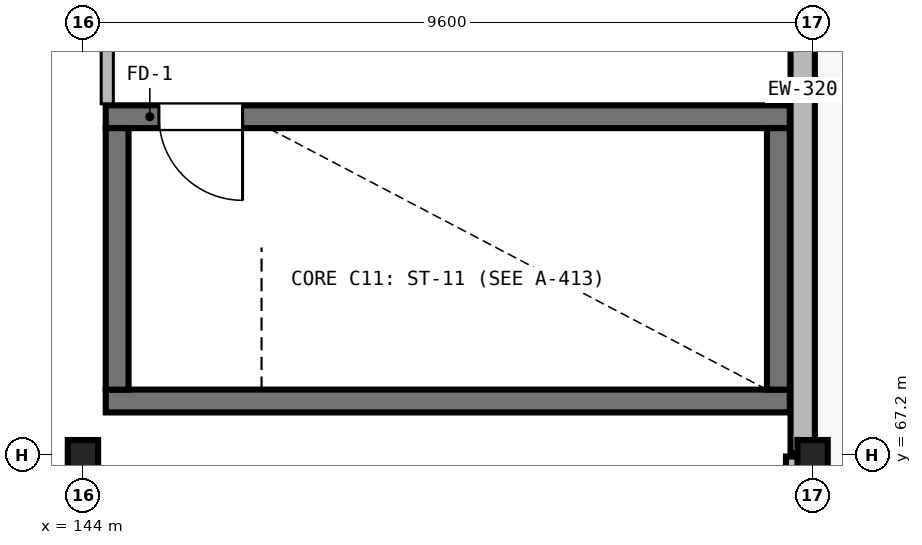
"""IFC4 building model, lengths in metres.
Left out: names, types, materials, properties, quantities, classifications, styles, units other than length and angle.
Written with IfcOpenShell. Run it as: python <this file> out.ifc"""

import sys

from ifc_helpers import new_model, si_unit, direction, frame, frame_2d, origin, origin_2d, place, context, subcontext, project, spatial, rectangle, i_section, extrude, element, fill, save


model = new_model("IFC4")
c1 = context("Model", 3, precision=1e-05, world=origin(), true_north=direction((0.0, 1.0)))
c2 = subcontext(c1, "Body", "Model", "MODEL_VIEW")
j1 = project(units=[si_unit("LENGTHUNIT", "METRE"), si_unit("PLANEANGLEUNIT", "RADIAN")], contexts=[c1])
p1 = place(None, origin())
s1 = spatial("IfcSite", under=j1, at=p1, CompositionType="ELEMENT")
p2 = place(p1, origin())
s2 = spatial("IfcBuilding", under=s1, at=p2, CompositionType="ELEMENT")
p3 = place(p2, origin())
s3 = spatial("IfcBuildingStorey", under=s2, at=p3, CompositionType="ELEMENT", Elevation=0.0)
for number, where, z_axis, x_axis in (
    (1, (144.0, 67.2, 0.0), (0.0, 0.0, 1.0), (1.0, 0.0, 0.0)),
    (2, (153.6, 67.2, 0.0), (0.0, 0.0, 1.0), (1.0, 0.0, 0.0)),
):
    element("IfcColumn", number, at=place(p3, frame(where, z_axis=z_axis, x_axis=x_axis)), inside=s3, PredefinedType="COLUMN", context=c2, shape_type="SweptSolid", body=[
        extrude(i_section(OverallWidth=0.399, OverallDepth=0.394, WebThickness=0.023, FlangeThickness=0.037, FilletRadius=0.015, at=origin_2d()), origin(), (0.0, 0.0, 1.0), 5.75),
    ])
p4 = place(p3, frame((144.3, 67.91, 0.0), z_axis=(0.0, 0.0, 1.0), x_axis=(1.0, 0.0, 0.0)))
e3 = element("IfcWall", 3, at=p4, inside=s3, PredefinedType="SHEAR", context=c2, shape_type="SweptSolid", body=[
    extrude(rectangle(XDim=9.0, YDim=0.3, at=frame_2d((4.5, 0.0))), origin(), (0.0, 0.0, 1.0), 5.75),
])
p5 = place(p3, frame((153.3, 71.65, 0.0), z_axis=(0.0, 0.0, 1.0), x_axis=(-1.0, 0.0, 0.0)))
e4 = element("IfcWall", 4, at=p5, inside=s3, PredefinedType="SHEAR", context=c2, shape_type="SweptSolid", body=[
    extrude(rectangle(XDim=9.0, YDim=0.3, at=frame_2d((4.5, 0.0))), origin(), (0.0, 0.0, 1.0), 5.75),
])
p6 = place(p5, frame((7.2, 0.0, 0.0)))
e5 = element("IfcOpeningElement", 5, at=p6, cuts=e4, PredefinedType="OPENING", context=c2, shape_type="SweptSolid", body=[
    extrude(rectangle(XDim=1.1, YDim=2.15, at=frame_2d((0.55, 1.075))), frame((0.0, 0.16, 0.0), z_axis=(0.0, -1.0, 0.0), x_axis=(1.0, 0.0, 0.0)), (0.0, 0.0, 1.0), 0.32),
])
for number, where, z_axis, x_axis in (
    (6, (144.45, 68.06, 0.0), (0.0, 0.0, 1.0), (0.0, 1.0, 0.0)),
    (7, (153.15, 71.5, 0.0), (0.0, 0.0, 1.0), (0.0, -1.0, 0.0)),
):
    element("IfcWall", number, at=place(p3, frame(where, z_axis=z_axis, x_axis=x_axis)), inside=s3, PredefinedType="SHEAR", context=c2, shape_type="SweptSolid", body=[
        extrude(rectangle(XDim=3.44, YDim=0.3, at=frame_2d((1.72, 0.0))), origin(), (0.0, 0.0, 1.0), 5.75),
    ])
p7 = place(p3, frame((153.425, 67.18, 0.0), z_axis=(0.0, 0.0, 1.0), x_axis=(0.0, -1.0, 0.0)))
e8 = element("IfcWall", 8, at=p7, inside=s3, PredefinedType="SOLIDWALL", context=c2, shape_type="SweptSolid", body=[
    extrude(rectangle(XDim=9.56, YDim=0.35, at=frame_2d((4.78, 0.0))), origin(), (0.0, 0.0, 1.0), 5.217),
])
p8 = place(p7, frame((1.2, 0.0, 0.0)))
e9 = element("IfcOpeningElement", 9, at=p8, cuts=e8, PredefinedType="OPENING", context=c2, shape_type="SweptSolid", body=[
    extrude(rectangle(XDim=2.6, YDim=2.5, at=frame_2d((1.3, 1.25))), frame((0.0, 0.185, 0.0), z_axis=(0.0, -1.0, 0.0), x_axis=(1.0, 0.0, 0.0)), (0.0, 0.0, 1.0), 0.37),
])
p9 = place(p7, frame((5.2, 0.0, 0.0)))
e10 = element("IfcOpeningElement", 10, at=p9, cuts=e8, PredefinedType="OPENING", context=c2, shape_type="SweptSolid", body=[
    extrude(rectangle(XDim=2.4, YDim=2.5, at=frame_2d((1.2, 1.25))), frame((0.0, 0.185, 0.0), z_axis=(0.0, -1.0, 0.0), x_axis=(1.0, 0.0, 0.0)), (0.0, 0.0, 1.0), 0.37),
])
p10 = place(p3, frame((153.47, 76.78, 0.0), z_axis=(0.0, 0.0, 1.0), x_axis=(0.0, -1.0, 0.0)))
e11 = element("IfcWall", 11, at=p10, inside=s3, PredefinedType="SOLIDWALL", context=c2, shape_type="SweptSolid", body=[
    extrude(rectangle(XDim=9.56, YDim=0.32, at=frame_2d((4.78, 0.0))), origin(), (0.0, 0.0, 1.0), 5.217),
])
p11 = place(p10, frame((1.6, 0.0, 0.0)))
e12 = element("IfcOpeningElement", 12, at=p11, cuts=e11, PredefinedType="OPENING", context=c2, shape_type="SweptSolid", body=[
    extrude(rectangle(XDim=1.6, YDim=2.2, at=frame_2d((0.8, 1.1))), frame((0.0, 0.17, 0.0), z_axis=(0.0, -1.0, 0.0), x_axis=(1.0, 0.0, 0.0)), (0.0, 0.0, 1.0), 0.34),
])
p12 = place(p3, frame((144.32, 71.82, 0.0), z_axis=(0.0, 0.0, 1.0), x_axis=(0.0, 1.0, 0.0)))
e13 = element("IfcWall", 13, at=p12, inside=s3, PredefinedType="PARTITIONING", context=c2, shape_type="SweptSolid", body=[
    extrude(rectangle(XDim=4.58, YDim=0.16, at=frame_2d((2.29, 0.0))), origin(), (0.0, 0.0, 1.0), 5.39),
])
p13 = place(p12, frame((1.1, 0.0, 0.0)))
e14 = element("IfcOpeningElement", 14, at=p13, cuts=e13, PredefinedType="OPENING", context=c2, shape_type="SweptSolid", body=[
    extrude(rectangle(XDim=1.1, YDim=2.2, at=frame_2d((0.55, 1.1))), frame((0.0, 0.09, 0.0), z_axis=(0.0, -1.0, 0.0), x_axis=(1.0, 0.0, 0.0)), (0.0, 0.0, 1.0), 0.18),
])
p14 = place(p6, origin())
e15 = element("IfcDoor", 15, at=p14, inside=s3, OperationType="SINGLE_SWING_LEFT", PredefinedType="DOOR", context=c2, shape_type="SweptSolid", body=[
    extrude(rectangle(XDim=1.1, YDim=2.15, at=frame_2d((0.55, 1.075))), frame((0.0, 0.025, 0.0), z_axis=(0.0, -1.0, 0.0), x_axis=(1.0, 0.0, 0.0)), (0.0, 0.0, 1.0), 0.05),
])
fill(e5, e15)
save(model, sys.argv[1])
